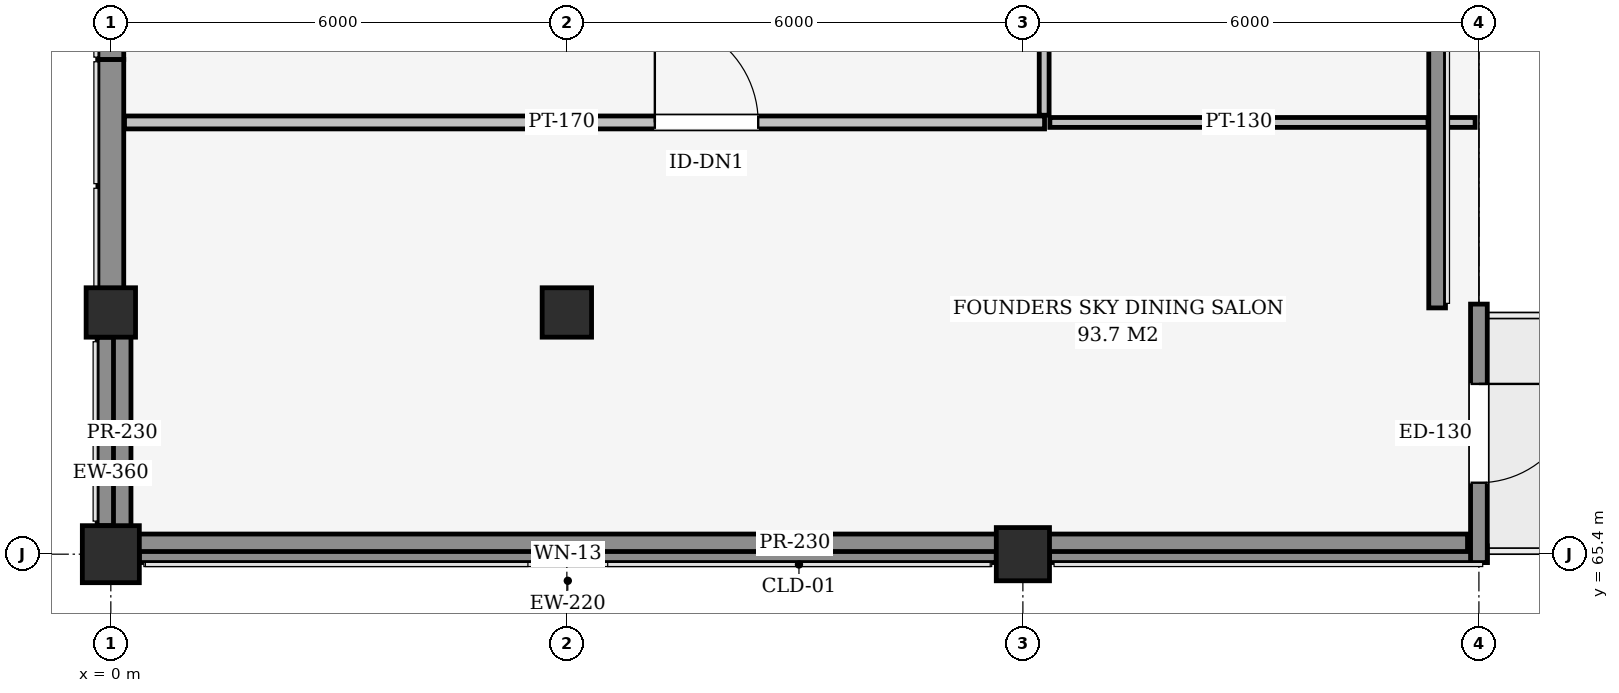
"""IFC4 building model, lengths in metres.
Left out: names, types, materials, properties, quantities, classifications, styles, units other than length and angle.
Written with IfcOpenShell. Run it as: python <this file> out.ifc"""

import sys

from ifc_helpers import new_model, si_unit, direction, frame, frame_2d, origin, origin_2d, place, context, subcontext, project, spatial, polyline, rectangle, outline, extrude, element, fill, save


model = new_model("IFC4")
c1 = context("Model", 3, precision=1e-05, world=origin(), true_north=direction((0.0, 1.0)))
c2 = subcontext(c1, "Body", "Model", "MODEL_VIEW")
j1 = project(units=[si_unit("LENGTHUNIT", "METRE"), si_unit("PLANEANGLEUNIT", "RADIAN")], contexts=[c1])
p1 = place(None, origin())
s1 = spatial("IfcSite", under=j1, at=p1, CompositionType="ELEMENT")
p2 = place(p1, origin())
s2 = spatial("IfcBuilding", under=s1, at=p2, CompositionType="ELEMENT")
p3 = place(p2, frame((0.0, 0.0, 22.2)))
s3 = spatial("IfcBuildingStorey", under=s2, at=p3, CompositionType="ELEMENT", Elevation=22.2)
p4 = place(p3, frame((0.0, 65.4, 0.0), z_axis=(0.0, 0.0, 1.0), x_axis=(1.0, 0.0, 0.0)))
e1 = element("IfcColumn", 1, at=p4, inside=s3, PredefinedType="COLUMN", context=c2, shape_type="SweptSolid", body=[
    extrude(rectangle(XDim=0.75, YDim=0.75, at=origin_2d()), origin(), (0.0, 0.0, 1.0), 4.37),
])
p5 = place(p3, frame((12.0, 65.4, 0.0), z_axis=(0.0, 0.0, 1.0), x_axis=(1.0, 0.0, 0.0)))
e2 = element("IfcColumn", 2, at=p5, inside=s3, PredefinedType="COLUMN", context=c2, shape_type="SweptSolid", body=[
    extrude(rectangle(XDim=0.7, YDim=0.7, at=origin_2d()), origin(), (0.0, 0.0, 1.0), 4.37),
])
for number, where, z_axis, x_axis in (
    (3, (0.0, 68.58, 0.0), (0.0, 0.0, 1.0), (1.0, 0.0, 0.0)),
    (4, (6.0, 68.58, 0.0), (0.0, 0.0, 1.0), (1.0, 0.0, 0.0)),
):
    element("IfcColumn", number, at=place(p3, frame(where, z_axis=z_axis, x_axis=x_axis)), inside=s3, PredefinedType="COLUMN", context=c2, shape_type="SweptSolid", body=[
        extrude(rectangle(XDim=0.65, YDim=0.65, at=origin_2d()), origin(), (0.0, 0.0, 1.0), 4.37),
    ])
p6 = place(p3, frame((11.65, 65.4, 0.0), z_axis=(0.0, 0.0, 1.0), x_axis=(-1.0, 0.0, 0.0)))
e5 = element("IfcWall", 5, at=p6, inside=s3, PredefinedType="SOLIDWALL", context=c2, shape_type="SweptSolid", body=[
    extrude(rectangle(XDim=11.275, YDim=0.22, at=frame_2d((5.637, 0.0))), origin(), (0.0, 0.0, 1.0), 3.977),
])
p7 = place(p6, frame((5.212, 0.0, 0.6)))
e6 = element("IfcOpeningElement", 6, at=p7, cuts=e5, PredefinedType="OPENING", context=c2, shape_type="SweptSolid", body=[
    extrude(rectangle(XDim=0.85, YDim=2.35, at=frame_2d((0.425, 1.175))), frame((0.0, 0.12, 0.0), z_axis=(0.0, -1.0, 0.0), x_axis=(1.0, 0.0, 0.0)), (0.0, 0.0, 1.0), 0.24),
])
p8 = place(p3, frame((18.11, 65.4, 0.0), z_axis=(0.0, 0.0, 1.0), x_axis=(-1.0, 0.0, 0.0)))
e7 = element("IfcWall", 7, at=p8, inside=s3, PredefinedType="SOLIDWALL", context=c2, shape_type="SweptSolid", body=[
    extrude(rectangle(XDim=5.76, YDim=0.22, at=frame_2d((2.88, 0.0))), origin(), (0.0, 0.0, 1.0), 4.5),
])
p9 = place(p3, frame((0.0, 65.775, 0.0), z_axis=(0.0, 0.0, 1.0), x_axis=(0.0, 1.0, 0.0)))
e8 = element("IfcWall", 8, at=p9, inside=s3, PredefinedType="SOLIDWALL", context=c2, shape_type="SweptSolid", body=[
    extrude(rectangle(XDim=2.48, YDim=0.36, at=frame_2d((1.24, 0.0))), origin(), (0.0, 0.0, 1.0), 3.738),
])
p10 = place(p3, frame((18.0, 68.69, 0.0), z_axis=(0.0, 0.0, 1.0), x_axis=(0.0, -1.0, 0.0)))
e9 = element("IfcWall", 9, at=p10, inside=s3, PredefinedType="SOLIDWALL", context=c2, shape_type="SweptSolid", body=[
    extrude(rectangle(XDim=3.4, YDim=0.22, at=frame_2d((1.7, 0.0))), origin(), (0.0, 0.0, 1.0), 3.15),
])
p11 = place(p10, frame((1.05, 0.0, 0.0)))
e10 = element("IfcOpeningElement", 10, at=p11, cuts=e9, PredefinedType="OPENING", context=c2, shape_type="SweptSolid", body=[
    extrude(rectangle(XDim=1.3, YDim=2.2, at=frame_2d((0.65, 1.1))), frame((0.0, 0.12, 0.0), z_axis=(0.0, -1.0, 0.0), x_axis=(1.0, 0.0, 0.0)), (0.0, 0.0, 1.0), 0.24),
])
p12 = place(p3, frame((17.45, 113.76, 0.0), z_axis=(0.0, 0.0, 1.0), x_axis=(0.0, -1.0, 0.0)))
e11 = element("IfcWall", 11, at=p12, inside=s3, PredefinedType="SOLIDWALL", context=c2, shape_type="SweptSolid", body=[
    extrude(rectangle(XDim=45.12, YDim=0.22, at=frame_2d((22.56, 0.0))), origin(), (0.0, 0.0, 1.0), 3.15),
])
p13 = place(p3, frame((0.0, 68.58, 0.0), z_axis=(0.0, 0.0, 1.0), x_axis=(0.0, 1.0, 0.0)))
e12 = element("IfcWall", 12, at=p13, inside=s3, PredefinedType="SOLIDWALL", context=c2, shape_type="SweptSolid", body=[
    extrude(outline(polyline([(0.0, 0.0), (3.329, 0.0), (3.329, 4.463), (0.0, 0.25), (0.0, 0.0)])), frame((0.0, 0.17, 0.0), z_axis=(0.0, -1.0, 0.0), x_axis=(1.0, 0.0, 0.0)), (0.0, 0.0, 1.0), 0.34),
])
p14 = place(p3, frame((0.0, 71.909, 0.0), z_axis=(0.0, 0.0, 1.0), x_axis=(0.0, 1.0, 0.0)))
e13 = element("IfcWall", 13, at=p14, inside=s3, PredefinedType="SOLIDWALL", context=c2, shape_type="SweptSolid", body=[
    extrude(outline(polyline([(0.0, 0.0), (4.24, 0.0), (4.24, 8.163), (0.0, 4.463), (0.0, 0.0)])), frame((0.0, 0.17, 0.0), z_axis=(0.0, -1.0, 0.0), x_axis=(1.0, 0.0, 0.0)), (0.0, 0.0, 1.0), 0.34),
])
p15 = place(p3, frame((0.15, 65.55, 4.56), z_axis=(0.0, 0.0, 1.0), x_axis=(1.0, 0.0, 0.0)))
e14 = element("IfcWall", 14, at=p15, inside=s3, PredefinedType="PARAPET", context=c2, shape_type="SweptSolid", body=[
    extrude(rectangle(XDim=17.7, YDim=0.23, at=frame_2d((8.85, 0.0))), origin(), (0.0, 0.0, 1.0), 0.94),
])
p16 = place(p3, frame((0.15, 65.55, 4.56), z_axis=(0.0, 0.0, 1.0), x_axis=(0.0, 1.0, 0.0)))
e15 = element("IfcWall", 15, at=p16, inside=s3, PredefinedType="PARAPET", context=c2, shape_type="SweptSolid", body=[
    extrude(rectangle(XDim=2.9, YDim=0.23, at=frame_2d((1.45, 0.0))), origin(), (0.0, 0.0, 1.0), 0.94),
])
p17 = place(p3, frame((0.18, 71.08, 0.0), z_axis=(0.0, 0.0, 1.0), x_axis=(1.0, 0.0, 0.0)))
e16 = element("IfcWall", 16, at=p17, inside=s3, PredefinedType="PARTITIONING", context=c2, shape_type="SweptSolid", body=[
    extrude(rectangle(XDim=12.105, YDim=0.17, at=frame_2d((6.052, 0.0))), origin(), (0.0, 0.0, 1.0), 4.5),
])
p18 = place(p17, frame((6.978, 0.0, 0.0)))
e17 = element("IfcOpeningElement", 17, at=p18, cuts=e16, PredefinedType="OPENING", context=c2, shape_type="SweptSolid", body=[
    extrude(rectangle(XDim=1.36, YDim=2.2, at=frame_2d((0.68, 1.1))), frame((0.0, 0.095, 0.0), z_axis=(0.0, -1.0, 0.0), x_axis=(1.0, 0.0, 0.0)), (0.0, 0.0, 1.0), 0.19),
])
p19 = place(p3, frame((12.28, 71.175, 0.0), z_axis=(0.0, 0.0, 1.0), x_axis=(0.0, 1.0, 0.0)))
e18 = element("IfcWall", 18, at=p19, inside=s3, PredefinedType="PARTITIONING", context=c2, shape_type="SweptSolid", body=[
    extrude(rectangle(XDim=11.292, YDim=0.13, at=frame_2d((5.646, 0.0))), origin(), (0.0, 0.0, 1.0), 4.5),
])
p20 = place(p3, frame((12.355, 71.08, 0.0), z_axis=(0.0, 0.0, 1.0), x_axis=(1.0, 0.0, 0.0)))
e19 = element("IfcWall", 19, at=p20, inside=s3, PredefinedType="PARTITIONING", context=c2, shape_type="SweptSolid", body=[
    extrude(rectangle(XDim=4.975, YDim=0.13, at=frame_2d((2.488, 0.0))), origin(), (0.0, 0.0, 1.0), 4.5),
])
p21 = place(p3, frame((17.57, 71.08, 0.0), z_axis=(0.0, 0.0, 1.0), x_axis=(1.0, 0.0, 0.0)))
e20 = element("IfcWall", 20, at=p21, inside=s3, PredefinedType="PARTITIONING", context=c2, shape_type="SweptSolid", body=[
    extrude(rectangle(XDim=0.38, YDim=0.13, at=frame_2d((0.19, 0.0))), origin(), (0.0, 0.0, 1.0), 4.5),
])
p22 = place(p7, origin())
e21 = element("IfcWindow", 21, at=p22, inside=s3, PartitioningType="SINGLE_PANEL", PredefinedType="WINDOW", context=c2, shape_type="SweptSolid", body=[
    extrude(rectangle(XDim=0.85, YDim=2.35, at=frame_2d((0.425, 1.175))), frame((0.0, 0.03, 0.0), z_axis=(0.0, -1.0, 0.0), x_axis=(1.0, 0.0, 0.0)), (0.0, 0.0, 1.0), 0.06),
])
fill(e6, e21)
p23 = place(p11, origin())
e22 = element("IfcDoor", 22, at=p23, inside=s3, OperationType="SINGLE_SWING_LEFT", PredefinedType="DOOR", context=c2, shape_type="SweptSolid", body=[
    extrude(rectangle(XDim=1.3, YDim=2.2, at=frame_2d((0.65, 1.1))), frame((0.0, 0.025, 0.0), z_axis=(0.0, -1.0, 0.0), x_axis=(1.0, 0.0, 0.0)), (0.0, 0.0, 1.0), 0.05),
])
fill(e10, e22)
p24 = place(p18, origin())
e23 = element("IfcDoor", 23, at=p24, inside=s3, OperationType="SINGLE_SWING_LEFT", PredefinedType="DOOR", context=c2, shape_type="SweptSolid", body=[
    extrude(rectangle(XDim=1.36, YDim=2.2, at=frame_2d((0.68, 1.1))), frame((0.0, 0.025, 0.0), z_axis=(0.0, -1.0, 0.0), x_axis=(1.0, 0.0, 0.0)), (0.0, 0.0, 1.0), 0.05),
])
fill(e17, e23)
save(model, sys.argv[1])
